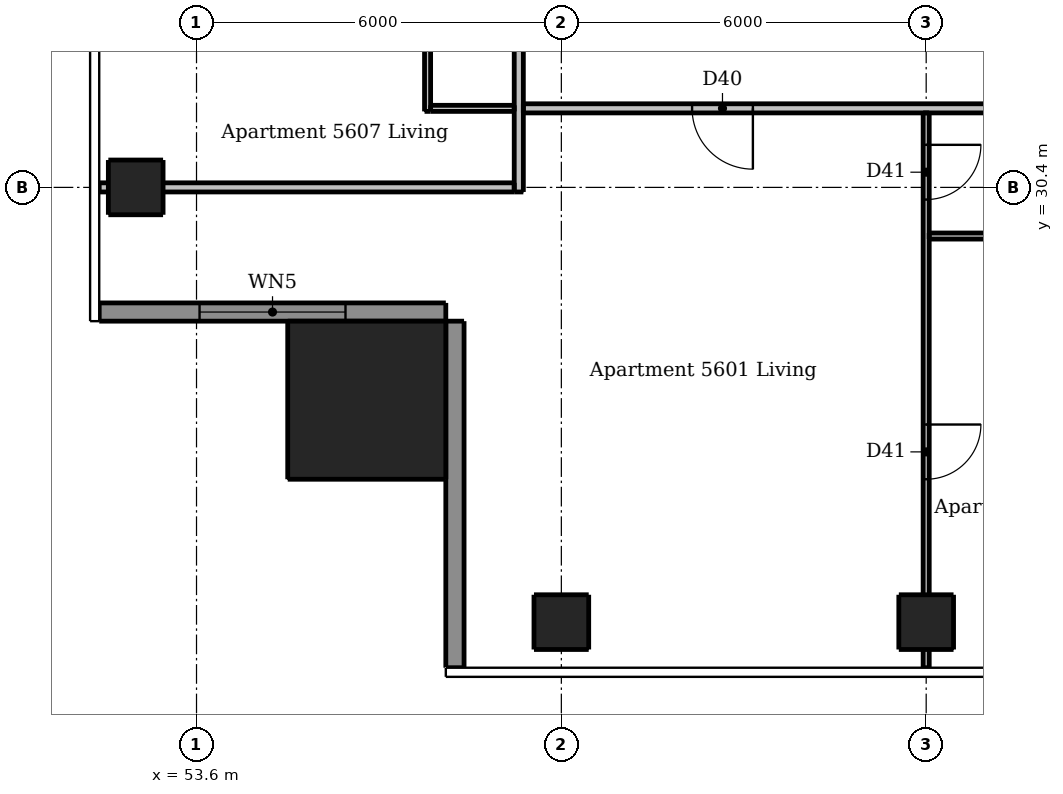
"""IFC4 building model, lengths in metres.
Left out: names, types, materials, properties, quantities, classifications, styles, units other than length and angle.
Written with IfcOpenShell. Run it as: python <this file> out.ifc"""

import sys

from ifc_helpers import new_model, si_unit, direction, frame, frame_2d, origin, origin_2d, place, context, subcontext, project, spatial, rectangle, extrude, element, fill, save


model = new_model("IFC4")
c1 = context("Model", 3, precision=1e-05, world=origin(), true_north=direction((0.0, 1.0)))
c2 = subcontext(c1, "Body", "Model", "MODEL_VIEW")
j1 = project(units=[si_unit("LENGTHUNIT", "METRE"), si_unit("PLANEANGLEUNIT", "RADIAN")], contexts=[c1])
p1 = place(None, origin())
s1 = spatial("IfcSite", under=j1, at=p1, CompositionType="ELEMENT")
p2 = place(p1, origin())
s2 = spatial("IfcBuilding", under=s1, at=p2, CompositionType="ELEMENT")
p3 = place(p2, frame((0.0, 0.0, 210.1)))
s3 = spatial("IfcBuildingStorey", under=s2, at=p3, CompositionType="ELEMENT", Elevation=210.1)
for number, where, z_axis, x_axis in (
    (1, (59.6, 23.25, 0.0), (0.0, 0.0, 1.0), (1.0, 0.0, 0.0)),
    (2, (65.6, 23.25, 0.0), (0.0, 0.0, 1.0), (1.0, 0.0, 0.0)),
    (3, (52.6, 30.4, 0.0), (0.0, 0.0, 1.0), (1.0, 0.0, 0.0)),
):
    element("IfcColumn", number, at=place(p3, frame(where, z_axis=z_axis, x_axis=x_axis)), inside=s3, PredefinedType="COLUMN", context=c2, shape_type="SweptSolid", body=[
        extrude(rectangle(XDim=0.9, YDim=0.9, at=origin_2d()), origin(), (0.0, 0.0, 1.0), 3.05),
    ])
p4 = place(p3, frame((56.4, 26.9, 0.0), z_axis=(0.0, 0.0, 1.0), x_axis=(1.0, 0.0, 0.0)))
e4 = element("IfcColumn", 4, at=p4, inside=s3, PredefinedType="COLUMN", context=c2, shape_type="SweptSolid", body=[
    extrude(rectangle(XDim=2.6, YDim=2.6, at=origin_2d()), origin(), (0.0, 0.0, 1.0), 3.3),
])
p5 = place(p3, frame((52.0, 28.35, 0.0), z_axis=(0.0, 0.0, 1.0), x_axis=(1.0, 0.0, 0.0)))
e5 = element("IfcWall", 5, at=p5, inside=s3, PredefinedType="SOLIDWALL", context=c2, shape_type="SweptSolid", body=[
    extrude(rectangle(XDim=5.7, YDim=0.3, at=frame_2d((2.85, 0.0))), origin(), (0.0, 0.0, 1.0), 3.05),
])
p6 = place(p5, frame((1.65, 0.0, 0.15)))
e6 = element("IfcOpeningElement", 6, at=p6, cuts=e5, PredefinedType="OPENING", context=c2, shape_type="SweptSolid", body=[
    extrude(rectangle(XDim=2.4, YDim=2.1, at=frame_2d((1.2, 1.05))), frame((0.0, 0.16, 0.0), z_axis=(0.0, -1.0, 0.0), x_axis=(1.0, 0.0, 0.0)), (0.0, 0.0, 1.0), 0.32),
])
p7 = place(p3, frame((57.85, 28.2, 0.0), z_axis=(0.0, 0.0, 1.0), x_axis=(0.0, -1.0, 0.0)))
e7 = element("IfcWall", 7, at=p7, inside=s3, PredefinedType="SOLIDWALL", context=c2, shape_type="SweptSolid", body=[
    extrude(rectangle(XDim=5.7, YDim=0.3, at=frame_2d((2.85, 0.0))), origin(), (0.0, 0.0, 1.0), 3.05),
])
p8 = place(p3, frame((57.4, 31.65, 0.0), z_axis=(0.0, 0.0, 1.0), x_axis=(0.0, 1.0, 0.0)))
e8 = element("IfcWall", 8, at=p8, inside=s3, PredefinedType="PARTITIONING", context=c2, shape_type="SweptSolid", body=[
    extrude(rectangle(XDim=16.675, YDim=0.1, at=frame_2d((8.337, 0.0))), origin(), (0.0, 0.0, 1.0), 3.05),
])
p9 = place(p8, frame((3.45, 0.0, 0.0)))
e9 = element("IfcOpeningElement", 9, at=p9, cuts=e8, PredefinedType="OPENING", context=c2, shape_type="SweptSolid", body=[
    extrude(rectangle(XDim=0.9, YDim=2.1, at=frame_2d((0.45, 1.05))), frame((0.0, 0.06, 0.0), z_axis=(0.0, -1.0, 0.0), x_axis=(1.0, 0.0, 0.0)), (0.0, 0.0, 1.0), 0.12),
])
p10 = place(p8, frame((8.8, 0.0, 0.0)))
e10 = element("IfcOpeningElement", 10, at=p10, cuts=e8, PredefinedType="OPENING", context=c2, shape_type="SweptSolid", body=[
    extrude(rectangle(XDim=0.9, YDim=2.1, at=frame_2d((0.45, 1.05))), frame((0.0, 0.06, 0.0), z_axis=(0.0, -1.0, 0.0), x_axis=(1.0, 0.0, 0.0)), (0.0, 0.0, 1.0), 0.12),
])
p11 = place(p8, frame((14.5, 0.0, 0.0)))
e11 = element("IfcOpeningElement", 11, at=p11, cuts=e8, PredefinedType="OPENING", context=c2, shape_type="SweptSolid", body=[
    extrude(rectangle(XDim=0.9, YDim=2.1, at=frame_2d((0.45, 1.05))), frame((0.0, 0.06, 0.0), z_axis=(0.0, -1.0, 0.0), x_axis=(1.0, 0.0, 0.0)), (0.0, 0.0, 1.0), 0.12),
])
p12 = place(p8, frame((11.55, 0.0, 0.0)))
e12 = element("IfcOpeningElement", 12, at=p12, cuts=e8, PredefinedType="OPENING", context=c2, shape_type="SweptSolid", body=[
    extrude(rectangle(XDim=0.8, YDim=2.1, at=frame_2d((0.4, 1.05))), frame((0.0, 0.06, 0.0), z_axis=(0.0, -1.0, 0.0), x_axis=(1.0, 0.0, 0.0)), (0.0, 0.0, 1.0), 0.12),
])
p13 = place(p3, frame((65.6, 31.625, 0.0), z_axis=(0.0, 0.0, 1.0), x_axis=(0.0, -1.0, 0.0)))
e13 = element("IfcWall", 13, at=p13, inside=s3, PredefinedType="PARTITIONING", context=c2, shape_type="SweptSolid", body=[
    extrude(rectangle(XDim=9.125, YDim=0.1, at=frame_2d((4.562, 0.0))), origin(), (0.0, 0.0, 1.0), 2.516),
])
p14 = place(p13, frame((0.525, 0.0, 0.0)))
e14 = element("IfcOpeningElement", 14, at=p14, cuts=e13, PredefinedType="OPENING", context=c2, shape_type="SweptSolid", body=[
    extrude(rectangle(XDim=0.9, YDim=2.1, at=frame_2d((0.45, 1.05))), frame((0.0, 0.06, 0.0), z_axis=(0.0, -1.0, 0.0), x_axis=(1.0, 0.0, 0.0)), (0.0, 0.0, 1.0), 0.12),
])
p15 = place(p13, frame((5.125, 0.0, 0.0)))
e15 = element("IfcOpeningElement", 15, at=p15, cuts=e13, PredefinedType="OPENING", context=c2, shape_type="SweptSolid", body=[
    extrude(rectangle(XDim=0.9, YDim=2.1, at=frame_2d((0.45, 1.05))), frame((0.0, 0.06, 0.0), z_axis=(0.0, -1.0, 0.0), x_axis=(1.0, 0.0, 0.0)), (0.0, 0.0, 1.0), 0.12),
])
p16 = place(p3, frame((57.45, 31.7, 0.0), z_axis=(0.0, 0.0, 1.0), x_axis=(1.0, 0.0, 0.0)))
e16 = element("IfcWall", 16, at=p16, inside=s3, PredefinedType="PARTITIONING", context=c2, shape_type="SweptSolid", body=[
    extrude(rectangle(XDim=1.375, YDim=0.1, at=frame_2d((0.688, 0.0))), origin(), (0.0, 0.0, 1.0), 3.05),
])
p17 = place(p3, frame((65.65, 29.6, 0.0), z_axis=(0.0, 0.0, 1.0), x_axis=(1.0, 0.0, 0.0)))
e17 = element("IfcWall", 17, at=p17, inside=s3, PredefinedType="PARTITIONING", context=c2, shape_type="SweptSolid", body=[
    extrude(rectangle(XDim=5.875, YDim=0.1, at=frame_2d((2.938, 0.0))), origin(), (0.0, 0.0, 1.0), 3.05),
])
p18 = place(p17, frame((3.75, 0.0, 0.0)))
e18 = element("IfcOpeningElement", 18, at=p18, cuts=e17, PredefinedType="OPENING", context=c2, shape_type="SweptSolid", body=[
    extrude(rectangle(XDim=0.8, YDim=2.1, at=frame_2d((0.4, 1.05))), frame((0.0, 0.06, 0.0), z_axis=(0.0, -1.0, 0.0), x_axis=(1.0, 0.0, 0.0)), (0.0, 0.0, 1.0), 0.12),
])
p19 = place(p3, frame((58.9, 30.325, 0.0), z_axis=(0.0, 0.0, 1.0), x_axis=(0.0, 1.0, 0.0)))
e19 = element("IfcWall", 19, at=p19, inside=s3, PredefinedType="PARTITIONING", context=c2, shape_type="SweptSolid", body=[
    extrude(rectangle(XDim=30.85, YDim=0.15, at=frame_2d((15.425, 0.0))), origin(), (0.0, 0.0, 1.0), 3.05),
])
p20 = place(p19, frame((9.225, 0.0, 0.0)))
e20 = element("IfcOpeningElement", 20, at=p20, cuts=e19, PredefinedType="OPENING", context=c2, shape_type="SweptSolid", body=[
    extrude(rectangle(XDim=1.0, YDim=2.1, at=frame_2d((0.5, 1.05))), frame((0.0, 0.085, 0.0), z_axis=(0.0, -1.0, 0.0), x_axis=(1.0, 0.0, 0.0)), (0.0, 0.0, 1.0), 0.17),
])
p21 = place(p19, frame((26.925, 0.0, 0.0)))
e21 = element("IfcOpeningElement", 21, at=p21, cuts=e19, PredefinedType="OPENING", context=c2, shape_type="SweptSolid", body=[
    extrude(rectangle(XDim=1.0, YDim=2.1, at=frame_2d((0.5, 1.05))), frame((0.0, 0.085, 0.0), z_axis=(0.0, -1.0, 0.0), x_axis=(1.0, 0.0, 0.0)), (0.0, 0.0, 1.0), 0.17),
])
p22 = place(p3, frame((89.525, 31.7, 0.0), z_axis=(0.0, 0.0, 1.0), x_axis=(-1.0, 0.0, 0.0)))
e22 = element("IfcWall", 22, at=p22, inside=s3, PredefinedType="PARTITIONING", context=c2, shape_type="SweptSolid", body=[
    extrude(rectangle(XDim=30.55, YDim=0.15, at=frame_2d((15.275, 0.0))), origin(), (0.0, 0.0, 1.0), 3.05),
])
p23 = place(p22, frame((26.775, 0.0, 0.0)))
e23 = element("IfcOpeningElement", 23, at=p23, cuts=e22, PredefinedType="OPENING", context=c2, shape_type="SweptSolid", body=[
    extrude(rectangle(XDim=1.0, YDim=2.1, at=frame_2d((0.5, 1.05))), frame((0.0, 0.085, 0.0), z_axis=(0.0, -1.0, 0.0), x_axis=(1.0, 0.0, 0.0)), (0.0, 0.0, 1.0), 0.17),
])
p24 = place(p22, frame((9.075, 0.0, 0.0)))
e24 = element("IfcOpeningElement", 24, at=p24, cuts=e22, PredefinedType="OPENING", context=c2, shape_type="SweptSolid", body=[
    extrude(rectangle(XDim=1.0, YDim=2.1, at=frame_2d((0.5, 1.05))), frame((0.0, 0.085, 0.0), z_axis=(0.0, -1.0, 0.0), x_axis=(1.0, 0.0, 0.0)), (0.0, 0.0, 1.0), 0.17),
])
p25 = place(p3, frame((52.0, 30.4, 0.0), z_axis=(0.0, 0.0, 1.0), x_axis=(1.0, 0.0, 0.0)))
e25 = element("IfcWall", 25, at=p25, inside=s3, PredefinedType="PARTITIONING", context=c2, shape_type="SweptSolid", body=[
    extrude(rectangle(XDim=6.825, YDim=0.15, at=frame_2d((3.413, 0.0))), origin(), (0.0, 0.0, 1.0), 2.647),
])
p26 = place(p6, origin())
e26 = element("IfcWindow", 26, at=p26, inside=s3, PartitioningType="DOUBLE_PANEL_VERTICAL", PredefinedType="WINDOW", context=c2, shape_type="SweptSolid", body=[
    extrude(rectangle(XDim=2.4, YDim=2.1, at=frame_2d((1.2, 1.05))), frame((0.0, 0.03, 0.0), z_axis=(0.0, -1.0, 0.0), x_axis=(1.0, 0.0, 0.0)), (0.0, 0.0, 1.0), 0.06),
])
fill(e6, e26)
p27 = place(p23, origin())
e27 = element("IfcDoor", 27, at=p27, inside=s3, OperationType="SINGLE_SWING_LEFT", PredefinedType="DOOR", context=c2, shape_type="SweptSolid", body=[
    extrude(rectangle(XDim=1.0, YDim=2.1, at=frame_2d((0.5, 1.05))), frame((0.0, 0.025, 0.0), z_axis=(0.0, -1.0, 0.0), x_axis=(1.0, 0.0, 0.0)), (0.0, 0.0, 1.0), 0.05),
])
fill(e23, e27)
p28 = place(p14, origin())
e28 = element("IfcDoor", 28, at=p28, inside=s3, OperationType="SINGLE_SWING_LEFT", PredefinedType="DOOR", context=c2, shape_type="SweptSolid", body=[
    extrude(rectangle(XDim=0.9, YDim=2.1, at=frame_2d((0.45, 1.05))), frame((0.0, 0.025, 0.0), z_axis=(0.0, -1.0, 0.0), x_axis=(1.0, 0.0, 0.0)), (0.0, 0.0, 1.0), 0.05),
])
fill(e14, e28)
p29 = place(p15, origin())
e29 = element("IfcDoor", 29, at=p29, inside=s3, OperationType="SINGLE_SWING_LEFT", PredefinedType="DOOR", context=c2, shape_type="SweptSolid", body=[
    extrude(rectangle(XDim=0.9, YDim=2.1, at=frame_2d((0.45, 1.05))), frame((0.0, 0.025, 0.0), z_axis=(0.0, -1.0, 0.0), x_axis=(1.0, 0.0, 0.0)), (0.0, 0.0, 1.0), 0.05),
])
fill(e15, e29)
save(model, sys.argv[1])
